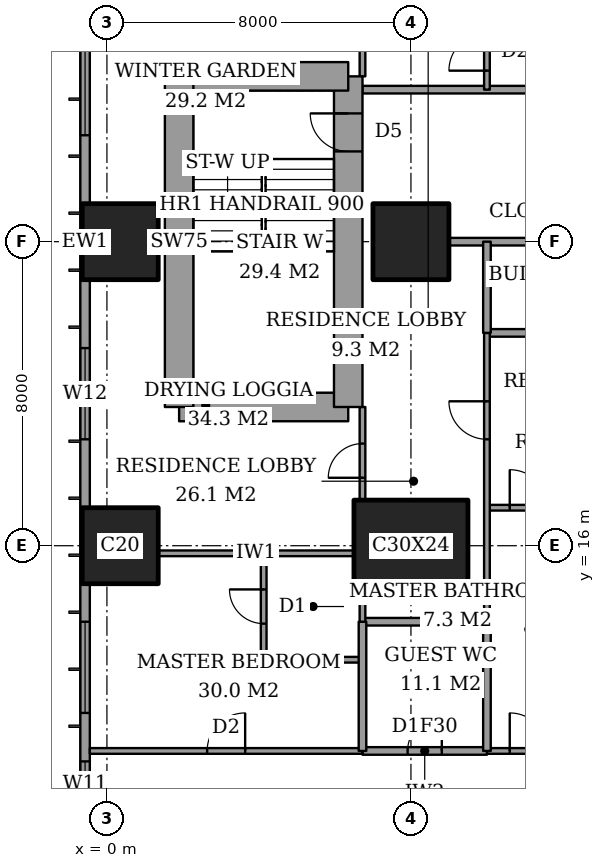
"""IFC4 building model, lengths in metres.
Left out: names, types, materials, properties, quantities, classifications, styles, units other than length and angle.
Written with IfcOpenShell. Run it as: python <this file> out.ifc"""

import sys

from ifc_helpers import new_model, si_unit, direction, frame, frame_2d, origin, origin_2d, place, context, subcontext, project, spatial, rectangle, extrude, element, fill, save


model = new_model("IFC4")
c1 = context("Model", 3, precision=1e-05, world=origin(), true_north=direction((0.0, 1.0)))
c2 = subcontext(c1, "Body", "Model", "MODEL_VIEW")
j1 = project(units=[si_unit("LENGTHUNIT", "METRE"), si_unit("PLANEANGLEUNIT", "RADIAN")], contexts=[c1])
p1 = place(None, origin())
s1 = spatial("IfcSite", under=j1, at=p1, CompositionType="ELEMENT")
p2 = place(p1, origin())
s2 = spatial("IfcBuilding", under=s1, at=p2, CompositionType="ELEMENT")
p3 = place(p2, frame((0.0, 0.0, 157.4)))
s3 = spatial("IfcBuildingStorey", under=s2, at=p3, CompositionType="ELEMENT", Elevation=157.4)
for number, where, z_axis, x_axis in (
    (1, (0.35, 16.0, 0.0), (0.0, 0.0, 1.0), (1.0, 0.0, 0.0)),
    (2, (0.35, 24.0, 0.0), (0.0, 0.0, 1.0), (1.0, 0.0, 0.0)),
):
    element("IfcColumn", number, at=place(p3, frame(where, z_axis=z_axis, x_axis=x_axis)), inside=s3, PredefinedType="COLUMN", context=c2, shape_type="SweptSolid", body=[
        extrude(rectangle(XDim=2.0, YDim=2.0, at=origin_2d()), origin(), (0.0, 0.0, 1.0), 3.6),
    ])
p4 = place(p3, frame((8.0, 16.0, 0.0), z_axis=(0.0, 0.0, 1.0), x_axis=(1.0, 0.0, 0.0)))
e3 = element("IfcColumn", 3, at=p4, inside=s3, PredefinedType="COLUMN", context=c2, shape_type="SweptSolid", body=[
    extrude(rectangle(XDim=3.0, YDim=2.4, at=origin_2d()), origin(), (0.0, 0.0, 1.0), 3.6),
])
p5 = place(p3, frame((8.0, 24.0, 0.0), z_axis=(0.0, 0.0, 1.0), x_axis=(1.0, 0.0, 0.0)))
e4 = element("IfcColumn", 4, at=p5, inside=s3, PredefinedType="COLUMN", context=c2, shape_type="SweptSolid", body=[
    extrude(rectangle(XDim=2.0, YDim=2.0, at=origin_2d()), origin(), (0.0, 0.0, 1.0), 3.6),
])
p6 = place(p3, frame((1.9, 19.65, 0.0), z_axis=(0.0, 0.0, 1.0), x_axis=(1.0, 0.0, 0.0)))
e5 = element("IfcWall", 5, at=p6, inside=s3, PredefinedType="SHEAR", context=c2, shape_type="SweptSolid", body=[
    extrude(rectangle(XDim=4.45, YDim=0.75, at=frame_2d((2.225, 0.0))), origin(), (0.0, 0.0, 1.0), 3.6),
])
p7 = place(p3, frame((6.35, 19.65, 0.0), z_axis=(0.0, 0.0, 1.0), x_axis=(0.0, 1.0, 0.0)))
e6 = element("IfcWall", 6, at=p7, inside=s3, PredefinedType="SHEAR", context=c2, shape_type="SweptSolid", body=[
    extrude(rectangle(XDim=8.7, YDim=0.75, at=frame_2d((4.35, 0.0))), origin(), (0.0, 0.0, 1.0), 3.6),
])
p8 = place(p7, frame((6.725, 0.0, 0.0)))
e7 = element("IfcOpeningElement", 7, at=p8, cuts=e6, PredefinedType="OPENING", context=c2, shape_type="SweptSolid", body=[
    extrude(rectangle(XDim=1.0, YDim=2.1, at=frame_2d((0.5, 1.05))), frame((0.0, 0.385, 0.0), z_axis=(0.0, -1.0, 0.0), x_axis=(1.0, 0.0, 0.0)), (0.0, 0.0, 1.0), 0.77),
])
p9 = place(p3, frame((6.35, 28.35, 0.0), z_axis=(0.0, 0.0, 1.0), x_axis=(-1.0, 0.0, 0.0)))
e8 = element("IfcWall", 8, at=p9, inside=s3, PredefinedType="SHEAR", context=c2, shape_type="SweptSolid", body=[
    extrude(rectangle(XDim=4.45, YDim=0.75, at=frame_2d((2.225, 0.0))), origin(), (0.0, 0.0, 1.0), 3.6),
])
p10 = place(p3, frame((1.9, 28.35, 0.0), z_axis=(0.0, 0.0, 1.0), x_axis=(0.0, -1.0, 0.0)))
e9 = element("IfcWall", 9, at=p10, inside=s3, PredefinedType="SHEAR", context=c2, shape_type="SweptSolid", body=[
    extrude(rectangle(XDim=8.7, YDim=0.75, at=frame_2d((4.35, 0.0))), origin(), (0.0, 0.0, 1.0), 3.6),
])
p11 = place(p3, frame((-0.575, 44.825, 0.0), z_axis=(0.0, 0.0, 1.0), x_axis=(0.0, -1.0, 0.0)))
e10 = element("IfcWall", 10, at=p11, inside=s3, PredefinedType="SOLIDWALL", context=c2, shape_type="SweptSolid", body=[
    extrude(rectangle(XDim=41.65, YDim=0.25, at=frame_2d((20.825, 0.0))), origin(), (0.0, 0.0, 1.0), 3.6),
])
p12 = place(p11, frame((0.775, 0.0, 0.4)))
e11 = element("IfcOpeningElement", 11, at=p12, cuts=e10, PredefinedType="OPENING", context=c2, shape_type="SweptSolid", body=[
    extrude(rectangle(XDim=2.4, YDim=2.2, at=frame_2d((1.2, 1.1))), frame((0.0, 0.135, 0.0), z_axis=(0.0, -1.0, 0.0), x_axis=(1.0, 0.0, 0.0)), (0.0, 0.0, 1.0), 0.27),
])
p13 = place(p11, frame((6.1, 0.0, 0.4)))
e12 = element("IfcOpeningElement", 12, at=p13, cuts=e10, PredefinedType="OPENING", context=c2, shape_type="SweptSolid", body=[
    extrude(rectangle(XDim=1.2, YDim=2.2, at=frame_2d((0.6, 1.1))), frame((0.0, 0.135, 0.0), z_axis=(0.0, -1.0, 0.0), x_axis=(1.0, 0.0, 0.0)), (0.0, 0.0, 1.0), 0.27),
])
p14 = place(p11, frame((8.425, 0.0, 0.4)))
e13 = element("IfcOpeningElement", 13, at=p14, cuts=e10, PredefinedType="OPENING", context=c2, shape_type="SweptSolid", body=[
    extrude(rectangle(XDim=2.4, YDim=2.2, at=frame_2d((1.2, 1.1))), frame((0.0, 0.135, 0.0), z_axis=(0.0, -1.0, 0.0), x_axis=(1.0, 0.0, 0.0)), (0.0, 0.0, 1.0), 0.27),
])
p15 = place(p11, frame((15.625, 0.0, 0.4)))
e14 = element("IfcOpeningElement", 14, at=p15, cuts=e10, PredefinedType="OPENING", context=c2, shape_type="SweptSolid", body=[
    extrude(rectangle(XDim=2.4, YDim=2.2, at=frame_2d((1.2, 1.1))), frame((0.0, 0.135, 0.0), z_axis=(0.0, -1.0, 0.0), x_axis=(1.0, 0.0, 0.0)), (0.0, 0.0, 1.0), 0.27),
])
p16 = place(p11, frame((23.625, 0.0, 0.4)))
e15 = element("IfcOpeningElement", 15, at=p16, cuts=e10, PredefinedType="OPENING", context=c2, shape_type="SweptSolid", body=[
    extrude(rectangle(XDim=2.4, YDim=2.2, at=frame_2d((1.2, 1.1))), frame((0.0, 0.135, 0.0), z_axis=(0.0, -1.0, 0.0), x_axis=(1.0, 0.0, 0.0)), (0.0, 0.0, 1.0), 0.27),
])
p17 = place(p11, frame((30.825, 0.0, 0.4)))
e16 = element("IfcOpeningElement", 16, at=p17, cuts=e10, PredefinedType="OPENING", context=c2, shape_type="SweptSolid", body=[
    extrude(rectangle(XDim=2.4, YDim=2.2, at=frame_2d((1.2, 1.1))), frame((0.0, 0.135, 0.0), z_axis=(0.0, -1.0, 0.0), x_axis=(1.0, 0.0, 0.0)), (0.0, 0.0, 1.0), 0.27),
])
p18 = place(p11, frame((34.5, 0.0, 0.4)))
e17 = element("IfcOpeningElement", 17, at=p18, cuts=e10, PredefinedType="OPENING", context=c2, shape_type="SweptSolid", body=[
    extrude(rectangle(XDim=1.2, YDim=2.2, at=frame_2d((0.6, 1.1))), frame((0.0, 0.135, 0.0), z_axis=(0.0, -1.0, 0.0), x_axis=(1.0, 0.0, 0.0)), (0.0, 0.0, 1.0), 0.27),
])
p19 = place(p11, frame((38.475, 0.0, 0.4)))
e18 = element("IfcOpeningElement", 18, at=p19, cuts=e10, PredefinedType="OPENING", context=c2, shape_type="SweptSolid", body=[
    extrude(rectangle(XDim=2.4, YDim=2.2, at=frame_2d((1.2, 1.1))), frame((0.0, 0.135, 0.0), z_axis=(0.0, -1.0, 0.0), x_axis=(1.0, 0.0, 0.0)), (0.0, 0.0, 1.0), 0.27),
])
p20 = place(p3, frame((6.725, 10.6, 0.0), z_axis=(0.0, 0.0, 1.0), x_axis=(1.0, 0.0, 0.0)))
e19 = element("IfcWall", 19, at=p20, inside=s3, PredefinedType="PARTITIONING", context=c2, shape_type="SweptSolid", body=[
    extrude(rectangle(XDim=3.275, YDim=0.2, at=frame_2d((1.637, 0.0))), origin(), (0.0, 0.0, 1.0), 3.35),
])
p21 = place(p20, frame((1.188, 0.0, 0.0)))
e20 = element("IfcOpeningElement", 20, at=p21, cuts=e19, PredefinedType="OPENING", context=c2, shape_type="SweptSolid", body=[
    extrude(rectangle(XDim=0.9, YDim=2.1, at=frame_2d((0.45, 1.05))), frame((0.0, 0.11, 0.0), z_axis=(0.0, -1.0, 0.0), x_axis=(1.0, 0.0, 0.0)), (0.0, 0.0, 1.0), 0.22),
])
p22 = place(p3, frame((-0.45, 10.6, 0.0), z_axis=(0.0, 0.0, 1.0), x_axis=(1.0, 0.0, 0.0)))
e21 = element("IfcWall", 21, at=p22, inside=s3, PredefinedType="PARTITIONING", context=c2, shape_type="SweptSolid", body=[
    extrude(rectangle(XDim=7.175, YDim=0.15, at=frame_2d((3.587, 0.0))), origin(), (0.0, 0.0, 1.0), 3.35),
])
p23 = place(p22, frame((3.087, 0.0, 0.0)))
e22 = element("IfcOpeningElement", 22, at=p23, cuts=e21, PredefinedType="OPENING", context=c2, shape_type="SweptSolid", body=[
    extrude(rectangle(XDim=1.0, YDim=2.1, at=frame_2d((0.5, 1.05))), frame((0.0, 0.085, 0.0), z_axis=(0.0, -1.0, 0.0), x_axis=(1.0, 0.0, 0.0)), (0.0, 0.0, 1.0), 0.17),
])
p24 = place(p3, frame((10.0, 10.6, 0.0), z_axis=(0.0, 0.0, 1.0), x_axis=(1.0, 0.0, 0.0)))
e23 = element("IfcWall", 23, at=p24, inside=s3, PredefinedType="PARTITIONING", context=c2, shape_type="SweptSolid", body=[
    extrude(rectangle(XDim=14.561, YDim=0.15, at=frame_2d((7.281, 0.0))), origin(), (0.0, 0.0, 1.0), 3.35),
])
p25 = place(p24, frame((0.6, 0.0, 0.0)))
e24 = element("IfcOpeningElement", 24, at=p25, cuts=e23, PredefinedType="OPENING", context=c2, shape_type="SweptSolid", body=[
    extrude(rectangle(XDim=1.0, YDim=2.1, at=frame_2d((0.5, 1.05))), frame((0.0, 0.085, 0.0), z_axis=(0.0, -1.0, 0.0), x_axis=(1.0, 0.0, 0.0)), (0.0, 0.0, 1.0), 0.17),
])
p26 = place(p24, frame((4.6, 0.0, 0.0)))
e25 = element("IfcOpeningElement", 25, at=p26, cuts=e23, PredefinedType="OPENING", context=c2, shape_type="SweptSolid", body=[
    extrude(rectangle(XDim=1.0, YDim=2.1, at=frame_2d((0.5, 1.05))), frame((0.0, 0.085, 0.0), z_axis=(0.0, -1.0, 0.0), x_axis=(1.0, 0.0, 0.0)), (0.0, 0.0, 1.0), 0.17),
])
p27 = place(p24, frame((10.725, 0.0, 0.0)))
e26 = element("IfcOpeningElement", 26, at=p27, cuts=e23, PredefinedType="OPENING", context=c2, shape_type="SweptSolid", body=[
    extrude(rectangle(XDim=1.0, YDim=2.1, at=frame_2d((0.5, 1.05))), frame((0.0, 0.085, 0.0), z_axis=(0.0, -1.0, 0.0), x_axis=(1.0, 0.0, 0.0)), (0.0, 0.0, 1.0), 0.17),
])
p28 = place(p3, frame((4.125, 13.0, 0.0), z_axis=(0.0, 0.0, 1.0), x_axis=(1.0, 0.0, 0.0)))
e27 = element("IfcWall", 27, at=p28, inside=s3, PredefinedType="PARTITIONING", context=c2, shape_type="SweptSolid", body=[
    extrude(rectangle(XDim=2.6, YDim=0.15, at=frame_2d((1.3, 0.0))), origin(), (0.0, 0.0, 1.0), 3.35),
])
p29 = place(p3, frame((6.725, 14.0, 0.0), z_axis=(0.0, 0.0, 1.0), x_axis=(1.0, 0.0, 0.0)))
e28 = element("IfcWall", 28, at=p29, inside=s3, PredefinedType="PARTITIONING", context=c2, shape_type="SweptSolid", body=[
    extrude(rectangle(XDim=3.275, YDim=0.2, at=frame_2d((1.637, 0.0))), origin(), (0.0, 0.0, 1.0), 3.35),
])
p30 = place(p3, frame((1.35, 15.8, 0.0), z_axis=(0.0, 0.0, 1.0), x_axis=(1.0, 0.0, 0.0)))
e29 = element("IfcWall", 29, at=p30, inside=s3, PredefinedType="PARTITIONING", context=c2, shape_type="SweptSolid", body=[
    extrude(rectangle(XDim=5.15, YDim=0.15, at=frame_2d((2.575, 0.0))), origin(), (0.0, 0.0, 1.0), 3.35),
])
p31 = place(p3, frame((10.0, 17.0, 0.0), z_axis=(0.0, 0.0, 1.0), x_axis=(1.0, 0.0, 0.0)))
e30 = element("IfcWall", 30, at=p31, inside=s3, PredefinedType="PARTITIONING", context=c2, shape_type="SweptSolid", body=[
    extrude(rectangle(XDim=4.4, YDim=0.15, at=frame_2d((2.2, 0.0))), origin(), (0.0, 0.0, 1.0), 3.35),
])
p32 = place(p31, frame((0.6, 0.0, 0.0)))
e31 = element("IfcOpeningElement", 31, at=p32, cuts=e30, PredefinedType="OPENING", context=c2, shape_type="SweptSolid", body=[
    extrude(rectangle(XDim=1.0, YDim=2.1, at=frame_2d((0.5, 1.05))), frame((0.0, 0.085, 0.0), z_axis=(0.0, -1.0, 0.0), x_axis=(1.0, 0.0, 0.0)), (0.0, 0.0, 1.0), 0.17),
])
p33 = place(p3, frame((10.0, 21.6, 0.0), z_axis=(0.0, 0.0, 1.0), x_axis=(1.0, 0.0, 0.0)))
e32 = element("IfcWall", 32, at=p33, inside=s3, PredefinedType="PARTITIONING", context=c2, shape_type="SweptSolid", body=[
    extrude(rectangle(XDim=4.8, YDim=0.2, at=frame_2d((2.4, 0.0))), origin(), (0.0, 0.0, 1.0), 3.35),
])
p34 = place(p33, frame((1.95, 0.0, 0.0)))
e33 = element("IfcOpeningElement", 33, at=p34, cuts=e32, PredefinedType="OPENING", context=c2, shape_type="SweptSolid", body=[
    extrude(rectangle(XDim=0.9, YDim=2.1, at=frame_2d((0.45, 1.05))), frame((0.0, 0.11, 0.0), z_axis=(0.0, -1.0, 0.0), x_axis=(1.0, 0.0, 0.0)), (0.0, 0.0, 1.0), 0.22),
])
p35 = place(p3, frame((9.0, 24.0, 0.0), z_axis=(0.0, 0.0, 1.0), x_axis=(1.0, 0.0, 0.0)))
e34 = element("IfcWall", 34, at=p35, inside=s3, PredefinedType="PARTITIONING", context=c2, shape_type="SweptSolid", body=[
    extrude(rectangle(XDim=6.0, YDim=0.2, at=frame_2d((3.0, 0.0))), origin(), (0.0, 0.0, 1.0), 3.35),
])
p36 = place(p3, frame((6.725, 28.0, 0.0), z_axis=(0.0, 0.0, 1.0), x_axis=(1.0, 0.0, 0.0)))
e35 = element("IfcWall", 35, at=p36, inside=s3, PredefinedType="PARTITIONING", context=c2, shape_type="SweptSolid", body=[
    extrude(rectangle(XDim=17.275, YDim=0.2, at=frame_2d((8.637, 0.0))), origin(), (0.0, 0.0, 1.0), 3.35),
])
p37 = place(p36, frame((6.675, 0.0, 0.0)))
e36 = element("IfcOpeningElement", 36, at=p37, cuts=e35, PredefinedType="OPENING", context=c2, shape_type="SweptSolid", body=[
    extrude(rectangle(XDim=1.2, YDim=2.4, at=frame_2d((0.6, 1.2))), frame((0.0, 0.11, 0.0), z_axis=(0.0, -1.0, 0.0), x_axis=(1.0, 0.0, 0.0)), (0.0, 0.0, 1.0), 0.22),
])
p38 = place(p3, frame((4.125, 13.0, 0.0), z_axis=(0.0, 0.0, 1.0), x_axis=(0.0, 1.0, 0.0)))
e37 = element("IfcWall", 37, at=p38, inside=s3, PredefinedType="PARTITIONING", context=c2, shape_type="SweptSolid", body=[
    extrude(rectangle(XDim=2.8, YDim=0.15, at=frame_2d((1.4, 0.0))), origin(), (0.0, 0.0, 1.0), 3.35),
])
p39 = place(p38, frame((0.95, 0.0, 0.0)))
e38 = element("IfcOpeningElement", 38, at=p39, cuts=e37, PredefinedType="OPENING", context=c2, shape_type="SweptSolid", body=[
    extrude(rectangle(XDim=0.9, YDim=2.1, at=frame_2d((0.45, 1.05))), frame((0.0, 0.085, 0.0), z_axis=(0.0, -1.0, 0.0), x_axis=(1.0, 0.0, 0.0)), (0.0, 0.0, 1.0), 0.17),
])
p40 = place(p3, frame((6.725, 10.6, 0.0), z_axis=(0.0, 0.0, 1.0), x_axis=(0.0, 1.0, 0.0)))
e39 = element("IfcWall", 39, at=p40, inside=s3, PredefinedType="PARTITIONING", context=c2, shape_type="SweptSolid", body=[
    extrude(rectangle(XDim=3.4, YDim=0.2, at=frame_2d((1.7, 0.0))), origin(), (0.0, 0.0, 1.0), 3.35),
])
p41 = place(p3, frame((6.725, 14.0, 0.0), z_axis=(0.0, 0.0, 1.0), x_axis=(0.0, 1.0, 0.0)))
e40 = element("IfcWall", 40, at=p41, inside=s3, PredefinedType="PARTITIONING", context=c2, shape_type="SweptSolid", body=[
    extrude(rectangle(XDim=0.8, YDim=0.15, at=frame_2d((0.4, 0.0))), origin(), (0.0, 0.0, 1.0), 3.35),
])
p42 = place(p3, frame((6.725, 17.2, 0.0), z_axis=(0.0, 0.0, 1.0), x_axis=(0.0, 1.0, 0.0)))
e41 = element("IfcWall", 41, at=p42, inside=s3, PredefinedType="PARTITIONING", context=c2, shape_type="SweptSolid", body=[
    extrude(rectangle(XDim=2.45, YDim=0.15, at=frame_2d((1.225, 0.0))), origin(), (0.0, 0.0, 1.0), 3.35),
])
p43 = place(p42, frame((0.587, 0.0, 0.0)))
e42 = element("IfcOpeningElement", 42, at=p43, cuts=e41, PredefinedType="OPENING", context=c2, shape_type="SweptSolid", body=[
    extrude(rectangle(XDim=0.9, YDim=2.1, at=frame_2d((0.45, 1.05))), frame((0.0, 0.085, 0.0), z_axis=(0.0, -1.0, 0.0), x_axis=(1.0, 0.0, 0.0)), (0.0, 0.0, 1.0), 0.17),
])
p44 = place(p3, frame((6.725, 28.35, 0.0), z_axis=(0.0, 0.0, 1.0), x_axis=(0.0, 1.0, 0.0)))
e43 = element("IfcWall", 43, at=p44, inside=s3, PredefinedType="PARTITIONING", context=c2, shape_type="SweptSolid", body=[
    extrude(rectangle(XDim=2.45, YDim=0.15, at=frame_2d((1.225, 0.0))), origin(), (0.0, 0.0, 1.0), 3.35),
])
p45 = place(p44, frame((0.913, 0.0, 0.0)))
e44 = element("IfcOpeningElement", 44, at=p45, cuts=e43, PredefinedType="OPENING", context=c2, shape_type="SweptSolid", body=[
    extrude(rectangle(XDim=1.0, YDim=2.1, at=frame_2d((0.5, 1.05))), frame((0.0, 0.085, 0.0), z_axis=(0.0, -1.0, 0.0), x_axis=(1.0, 0.0, 0.0)), (0.0, 0.0, 1.0), 0.17),
])
p46 = place(p3, frame((10.0, 10.6, 0.0), z_axis=(0.0, 0.0, 1.0), x_axis=(0.0, 1.0, 0.0)))
e45 = element("IfcWall", 45, at=p46, inside=s3, PredefinedType="PARTITIONING", context=c2, shape_type="SweptSolid", body=[
    extrude(rectangle(XDim=3.4, YDim=0.2, at=frame_2d((1.7, 0.0))), origin(), (0.0, 0.0, 1.0), 3.35),
])
p47 = place(p3, frame((10.0, 21.6, 0.0), z_axis=(0.0, 0.0, 1.0), x_axis=(0.0, 1.0, 0.0)))
e46 = element("IfcWall", 46, at=p47, inside=s3, PredefinedType="PARTITIONING", context=c2, shape_type="SweptSolid", body=[
    extrude(rectangle(XDim=2.4, YDim=0.2, at=frame_2d((1.2, 0.0))), origin(), (0.0, 0.0, 1.0), 3.35),
])
p48 = place(p3, frame((10.0, 14.0, 0.0), z_axis=(0.0, 0.0, 1.0), x_axis=(0.0, 1.0, 0.0)))
e47 = element("IfcWall", 47, at=p48, inside=s3, PredefinedType="PARTITIONING", context=c2, shape_type="SweptSolid", body=[
    extrude(rectangle(XDim=7.6, YDim=0.15, at=frame_2d((3.8, 0.0))), origin(), (0.0, 0.0, 1.0), 3.35),
])
p49 = place(p48, frame((4.8, 0.0, 0.0)))
e48 = element("IfcOpeningElement", 48, at=p49, cuts=e47, PredefinedType="OPENING", context=c2, shape_type="SweptSolid", body=[
    extrude(rectangle(XDim=1.0, YDim=2.1, at=frame_2d((0.5, 1.05))), frame((0.0, 0.085, 0.0), z_axis=(0.0, -1.0, 0.0), x_axis=(1.0, 0.0, 0.0)), (0.0, 0.0, 1.0), 0.17),
])
p50 = place(p3, frame((10.0, 28.0, 0.0), z_axis=(0.0, 0.0, 1.0), x_axis=(0.0, 1.0, 0.0)))
e49 = element("IfcWall", 49, at=p50, inside=s3, PredefinedType="PARTITIONING", context=c2, shape_type="SweptSolid", body=[
    extrude(rectangle(XDim=9.4, YDim=0.15, at=frame_2d((4.7, 0.0))), origin(), (0.0, 0.0, 1.0), 3.35),
])
p51 = place(p50, frame((0.5, 0.0, 0.0)))
e50 = element("IfcOpeningElement", 50, at=p51, cuts=e49, PredefinedType="OPENING", context=c2, shape_type="SweptSolid", body=[
    extrude(rectangle(XDim=1.0, YDim=2.1, at=frame_2d((0.5, 1.05))), frame((0.0, 0.085, 0.0), z_axis=(0.0, -1.0, 0.0), x_axis=(1.0, 0.0, 0.0)), (0.0, 0.0, 1.0), 0.17),
])
p52 = place(p15, origin())
e51 = element("IfcWindow", 51, at=p52, inside=s3, PartitioningType="SINGLE_PANEL", PredefinedType="WINDOW", context=c2, shape_type="SweptSolid", body=[
    extrude(rectangle(XDim=2.4, YDim=2.2, at=frame_2d((1.2, 1.1))), frame((0.0, 0.03, 0.0), z_axis=(0.0, -1.0, 0.0), x_axis=(1.0, 0.0, 0.0)), (0.0, 0.0, 1.0), 0.06),
])
fill(e14, e51)
p53 = place(p16, origin())
e52 = element("IfcWindow", 52, at=p53, inside=s3, PartitioningType="SINGLE_PANEL", PredefinedType="WINDOW", context=c2, shape_type="SweptSolid", body=[
    extrude(rectangle(XDim=2.4, YDim=2.2, at=frame_2d((1.2, 1.1))), frame((0.0, 0.03, 0.0), z_axis=(0.0, -1.0, 0.0), x_axis=(1.0, 0.0, 0.0)), (0.0, 0.0, 1.0), 0.06),
])
fill(e15, e52)
p54 = place(p17, origin())
e53 = element("IfcWindow", 53, at=p54, inside=s3, PartitioningType="SINGLE_PANEL", PredefinedType="WINDOW", context=c2, shape_type="SweptSolid", body=[
    extrude(rectangle(XDim=2.4, YDim=2.2, at=frame_2d((1.2, 1.1))), frame((0.0, 0.03, 0.0), z_axis=(0.0, -1.0, 0.0), x_axis=(1.0, 0.0, 0.0)), (0.0, 0.0, 1.0), 0.06),
])
fill(e16, e53)
p55 = place(p18, origin())
e54 = element("IfcWindow", 54, at=p55, inside=s3, PartitioningType="SINGLE_PANEL", PredefinedType="WINDOW", context=c2, shape_type="SweptSolid", body=[
    extrude(rectangle(XDim=1.2, YDim=2.2, at=frame_2d((0.6, 1.1))), frame((0.0, 0.03, 0.0), z_axis=(0.0, -1.0, 0.0), x_axis=(1.0, 0.0, 0.0)), (0.0, 0.0, 1.0), 0.06),
])
fill(e17, e54)
p56 = place(p25, origin())
e55 = element("IfcDoor", 55, at=p56, inside=s3, OperationType="SINGLE_SWING_RIGHT", PredefinedType="DOOR", context=c2, shape_type="SweptSolid", body=[
    extrude(rectangle(XDim=1.0, YDim=2.1, at=frame_2d((0.5, 1.05))), frame((0.0, 0.025, 0.0), z_axis=(0.0, -1.0, 0.0), x_axis=(1.0, 0.0, 0.0)), (0.0, 0.0, 1.0), 0.05),
])
fill(e24, e55)
p57 = place(p39, origin())
e56 = element("IfcDoor", 56, at=p57, inside=s3, OperationType="SINGLE_SWING_LEFT", PredefinedType="DOOR", context=c2, shape_type="SweptSolid", body=[
    extrude(rectangle(XDim=0.9, YDim=2.1, at=frame_2d((0.45, 1.05))), frame((0.0, 0.025, 0.0), z_axis=(0.0, -1.0, 0.0), x_axis=(1.0, 0.0, 0.0)), (0.0, 0.0, 1.0), 0.05),
])
fill(e38, e56)
p58 = place(p23, origin())
e57 = element("IfcDoor", 57, at=p58, inside=s3, OperationType="SINGLE_SWING_LEFT", PredefinedType="DOOR", context=c2, shape_type="SweptSolid", body=[
    extrude(rectangle(XDim=1.0, YDim=2.1, at=frame_2d((0.5, 1.05))), frame((0.0, 0.025, 0.0), z_axis=(0.0, -1.0, 0.0), x_axis=(1.0, 0.0, 0.0)), (0.0, 0.0, 1.0), 0.05),
])
fill(e22, e57)
p59 = place(p43, origin())
e58 = element("IfcDoor", 58, at=p59, inside=s3, OperationType="SINGLE_SWING_RIGHT", PredefinedType="DOOR", context=c2, shape_type="SweptSolid", body=[
    extrude(rectangle(XDim=0.9, YDim=2.1, at=frame_2d((0.45, 1.05))), frame((0.0, 0.025, 0.0), z_axis=(0.0, -1.0, 0.0), x_axis=(1.0, 0.0, 0.0)), (0.0, 0.0, 1.0), 0.05),
])
fill(e42, e58)
p60 = place(p21, origin())
e59 = element("IfcDoor", 59, at=p60, inside=s3, OperationType="SINGLE_SWING_LEFT", PredefinedType="DOOR", context=c2, shape_type="SweptSolid", body=[
    extrude(rectangle(XDim=0.9, YDim=2.1, at=frame_2d((0.45, 1.05))), frame((0.0, 0.025, 0.0), z_axis=(0.0, -1.0, 0.0), x_axis=(1.0, 0.0, 0.0)), (0.0, 0.0, 1.0), 0.05),
])
fill(e20, e59)
p61 = place(p49, origin())
e60 = element("IfcDoor", 60, at=p61, inside=s3, OperationType="SINGLE_SWING_LEFT", PredefinedType="DOOR", context=c2, shape_type="SweptSolid", body=[
    extrude(rectangle(XDim=1.0, YDim=2.1, at=frame_2d((0.5, 1.05))), frame((0.0, 0.025, 0.0), z_axis=(0.0, -1.0, 0.0), x_axis=(1.0, 0.0, 0.0)), (0.0, 0.0, 1.0), 0.05),
])
fill(e48, e60)
p62 = place(p32, origin())
e61 = element("IfcDoor", 61, at=p62, inside=s3, OperationType="SINGLE_SWING_RIGHT", PredefinedType="DOOR", context=c2, shape_type="SweptSolid", body=[
    extrude(rectangle(XDim=1.0, YDim=2.1, at=frame_2d((0.5, 1.05))), frame((0.0, 0.025, 0.0), z_axis=(0.0, -1.0, 0.0), x_axis=(1.0, 0.0, 0.0)), (0.0, 0.0, 1.0), 0.05),
])
fill(e31, e61)
p63 = place(p51, origin())
e62 = element("IfcDoor", 62, at=p63, inside=s3, OperationType="SINGLE_SWING_RIGHT", PredefinedType="DOOR", context=c2, shape_type="SweptSolid", body=[
    extrude(rectangle(XDim=1.0, YDim=2.1, at=frame_2d((0.5, 1.05))), frame((0.0, 0.025, 0.0), z_axis=(0.0, -1.0, 0.0), x_axis=(1.0, 0.0, 0.0)), (0.0, 0.0, 1.0), 0.05),
])
fill(e50, e62)
p64 = place(p8, origin())
e63 = element("IfcDoor", 63, at=p64, inside=s3, OperationType="SINGLE_SWING_LEFT", PredefinedType="DOOR", context=c2, shape_type="SweptSolid", body=[
    extrude(rectangle(XDim=1.0, YDim=2.1, at=frame_2d((0.5, 1.05))), frame((0.0, 0.025, 0.0), z_axis=(0.0, -1.0, 0.0), x_axis=(1.0, 0.0, 0.0)), (0.0, 0.0, 1.0), 0.05),
])
fill(e7, e63)
save(model, sys.argv[1])
